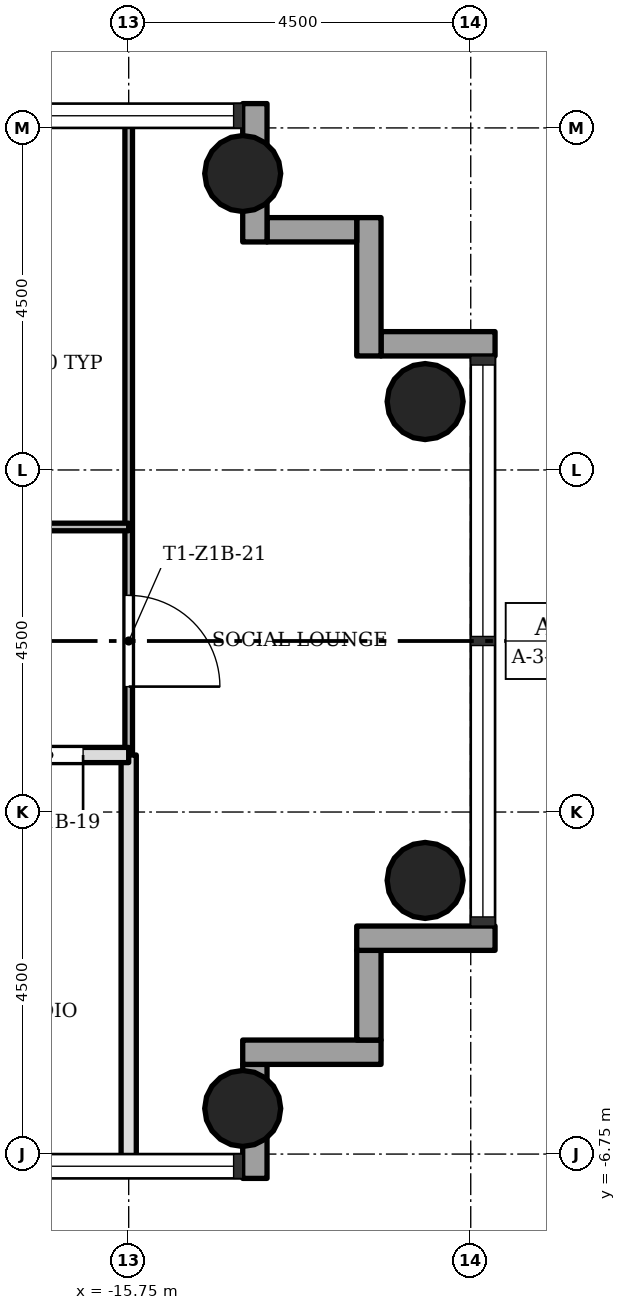
"""IFC4 building model, lengths in metres.
Left out: names, types, materials, properties, quantities, classifications, styles, units other than length and angle.
Written with IfcOpenShell. Run it as: python <this file> out.ifc"""

import sys

from ifc_helpers import new_model, si_unit, direction, frame, frame_2d, origin, origin_2d, place, context, subcontext, project, spatial, rectangle, hollow_circle, extrude, element, fill, save


model = new_model("IFC4")
c1 = context("Model", 3, precision=1e-05, world=origin(), true_north=direction((0.0, 1.0)))
c2 = subcontext(c1, "Body", "Model", "MODEL_VIEW")
j1 = project(units=[si_unit("LENGTHUNIT", "METRE"), si_unit("PLANEANGLEUNIT", "RADIAN")], contexts=[c1])
p1 = place(None, origin())
s1 = spatial("IfcSite", under=j1, at=p1, CompositionType="ELEMENT")
p2 = place(p1, origin())
s2 = spatial("IfcBuilding", under=s1, at=p2, CompositionType="ELEMENT")
p3 = place(p2, frame((0.0, 0.0, 34.7)))
s3 = spatial("IfcBuildingStorey", under=s2, at=p3, CompositionType="ELEMENT", Elevation=34.7)
for number, where, z_axis, x_axis in (
    (1, (-14.25, -6.15, 0.0), (0.0, 0.0, 1.0), (1.0, 0.0, 0.0)),
    (2, (-14.25, 6.15, 0.0), (0.0, 0.0, 1.0), (1.0, 0.0, 0.0)),
    (3, (-11.85, -3.15, 0.0), (0.0, 0.0, 1.0), (1.0, 0.0, 0.0)),
    (4, (-11.85, 3.15, 0.0), (0.0, 0.0, 1.0), (1.0, 0.0, 0.0)),
):
    element("IfcColumn", number, at=place(p3, frame(where, z_axis=z_axis, x_axis=x_axis)), inside=s3, PredefinedType="COLUMN", context=c2, shape_type="SweptSolid", body=[
        extrude(hollow_circle(Radius=0.5, WallThickness=0.036, at=origin_2d()), origin(), (0.0, 0.0, 1.0), 3.4),
    ])
p4 = place(p3, frame((-14.09, -7.07, -0.3), z_axis=(0.0, 0.0, 1.0), x_axis=(0.0, 1.0, 0.0)))
e5 = element("IfcWall", 5, at=p4, inside=s3, PredefinedType="STANDARD", context=c2, shape_type="SweptSolid", body=[
    extrude(rectangle(XDim=1.5, YDim=0.32, at=frame_2d((0.75, 0.0))), origin(), (0.0, 0.0, 1.0), 3.4),
])
p5 = place(p3, frame((-14.25, -5.41, -0.3), z_axis=(0.0, 0.0, 1.0), x_axis=(1.0, 0.0, 0.0)))
e6 = element("IfcWall", 6, at=p5, inside=s3, PredefinedType="STANDARD", context=c2, shape_type="SweptSolid", body=[
    extrude(rectangle(XDim=1.82, YDim=0.32, at=frame_2d((0.91, 0.0))), origin(), (0.0, 0.0, 1.0), 3.4),
])
p6 = place(p3, frame((-12.59, -5.25, -0.3), z_axis=(0.0, 0.0, 1.0), x_axis=(0.0, 1.0, 0.0)))
e7 = element("IfcWall", 7, at=p6, inside=s3, PredefinedType="STANDARD", context=c2, shape_type="SweptSolid", body=[
    extrude(rectangle(XDim=1.18, YDim=0.32, at=frame_2d((0.59, 0.0))), origin(), (0.0, 0.0, 1.0), 3.4),
])
p7 = place(p3, frame((-12.75, -3.91, -0.3), z_axis=(0.0, 0.0, 1.0), x_axis=(1.0, 0.0, 0.0)))
e8 = element("IfcWall", 8, at=p7, inside=s3, PredefinedType="STANDARD", context=c2, shape_type="SweptSolid", body=[
    extrude(rectangle(XDim=1.82, YDim=0.32, at=frame_2d((0.91, 0.0))), origin(), (0.0, 0.0, 1.0), 3.4),
])
p8 = place(p3, frame((-10.93, 3.91, -0.3), z_axis=(0.0, 0.0, 1.0), x_axis=(-1.0, 0.0, 0.0)))
e9 = element("IfcWall", 9, at=p8, inside=s3, PredefinedType="STANDARD", context=c2, shape_type="SweptSolid", body=[
    extrude(rectangle(XDim=1.5, YDim=0.32, at=frame_2d((0.75, 0.0))), origin(), (0.0, 0.0, 1.0), 3.4),
])
p9 = place(p3, frame((-12.59, 3.75, -0.3), z_axis=(0.0, 0.0, 1.0), x_axis=(0.0, 1.0, 0.0)))
e10 = element("IfcWall", 10, at=p9, inside=s3, PredefinedType="STANDARD", context=c2, shape_type="SweptSolid", body=[
    extrude(rectangle(XDim=1.82, YDim=0.32, at=frame_2d((0.91, 0.0))), origin(), (0.0, 0.0, 1.0), 3.4),
])
p10 = place(p3, frame((-12.75, 5.41, -0.3), z_axis=(0.0, 0.0, 1.0), x_axis=(-1.0, 0.0, 0.0)))
e11 = element("IfcWall", 11, at=p10, inside=s3, PredefinedType="STANDARD", context=c2, shape_type="SweptSolid", body=[
    extrude(rectangle(XDim=1.18, YDim=0.32, at=frame_2d((0.59, 0.0))), origin(), (0.0, 0.0, 1.0), 3.4),
])
p11 = place(p3, frame((-14.09, 5.25, -0.3), z_axis=(0.0, 0.0, 1.0), x_axis=(0.0, 1.0, 0.0)))
e12 = element("IfcWall", 12, at=p11, inside=s3, PredefinedType="STANDARD", context=c2, shape_type="SweptSolid", body=[
    extrude(rectangle(XDim=1.82, YDim=0.32, at=frame_2d((0.91, 0.0))), origin(), (0.0, 0.0, 1.0), 3.4),
])
p12 = place(p3, frame((-15.75, -1.5, 0.0), z_axis=(0.0, 0.0, 1.0), x_axis=(0.0, 1.0, 0.0)))
e13 = element("IfcWall", 13, at=p12, inside=s3, PredefinedType="PARTITIONING", context=c2, shape_type="SweptSolid", body=[
    extrude(rectangle(XDim=8.35, YDim=0.1, at=frame_2d((4.175, 0.0))), origin(), (0.0, 0.0, 1.0), 3.0),
])
p13 = place(p12, frame((0.9, 0.0, 0.0)))
e14 = element("IfcOpeningElement", 14, at=p13, cuts=e13, PredefinedType="OPENING", context=c2, shape_type="SweptSolid", body=[
    extrude(rectangle(XDim=1.2, YDim=2.1, at=frame_2d((0.6, 1.05))), frame((0.0, 0.06, 0.0), z_axis=(0.0, -1.0, 0.0), x_axis=(1.0, 0.0, 0.0)), (0.0, 0.0, 1.0), 0.12),
])
p14 = place(p3, frame((-15.75, -6.85, 0.0), z_axis=(0.0, 0.0, 1.0), x_axis=(0.0, 1.0, 0.0)))
e15 = element("IfcWall", 15, at=p14, inside=s3, PredefinedType="SOLIDWALL", context=c2, shape_type="SweptSolid", body=[
    extrude(rectangle(XDim=5.35, YDim=0.2, at=frame_2d((2.675, 0.0))), origin(), (0.0, 0.0, 1.0), 3.0),
])
p15 = place(p3, frame((-20.25, -1.5, 0.0), z_axis=(0.0, 0.0, 1.0), x_axis=(1.0, 0.0, 0.0)))
e16 = element("IfcWall", 16, at=p15, inside=s3, PredefinedType="SOLIDWALL", context=c2, shape_type="SweptSolid", body=[
    extrude(rectangle(XDim=4.5, YDim=0.2, at=frame_2d((2.25, 0.0))), origin(), (0.0, 0.0, 1.0), 3.0),
])
p16 = place(p15, frame((3.0, 0.0, 0.0)))
e17 = element("IfcOpeningElement", 17, at=p16, cuts=e16, PredefinedType="OPENING", context=c2, shape_type="SweptSolid", body=[
    extrude(rectangle(XDim=0.9, YDim=2.1, at=frame_2d((0.45, 1.05))), frame((0.0, 0.11, 0.0), z_axis=(0.0, -1.0, 0.0), x_axis=(1.0, 0.0, 0.0)), (0.0, 0.0, 1.0), 0.22),
])
p17 = place(p3, frame((-20.25, 1.5, 0.0), z_axis=(0.0, 0.0, 1.0), x_axis=(1.0, 0.0, 0.0)))
e18 = element("IfcWall", 18, at=p17, inside=s3, PredefinedType="PARTITIONING", context=c2, shape_type="SweptSolid", body=[
    extrude(rectangle(XDim=4.5, YDim=0.1, at=frame_2d((2.25, 0.0))), origin(), (0.0, 0.0, 1.0), 3.0),
])
p18 = place(p17, frame((1.8, 0.0, 0.0)))
e19 = element("IfcOpeningElement", 19, at=p18, cuts=e18, PredefinedType="OPENING", context=c2, shape_type="SweptSolid", body=[
    extrude(rectangle(XDim=0.9, YDim=2.1, at=frame_2d((0.45, 1.05))), frame((0.0, 0.06, 0.0), z_axis=(0.0, -1.0, 0.0), x_axis=(1.0, 0.0, 0.0)), (0.0, 0.0, 1.0), 0.12),
])
p19 = place(p16, origin())
e20 = element("IfcDoor", 20, at=p19, inside=s3, OperationType="SINGLE_SWING_RIGHT", PredefinedType="DOOR", context=c2, shape_type="SweptSolid", body=[
    extrude(rectangle(XDim=0.9, YDim=2.1, at=frame_2d((0.45, 1.05))), frame((0.0, 0.025, 0.0), z_axis=(0.0, -1.0, 0.0), x_axis=(1.0, 0.0, 0.0)), (0.0, 0.0, 1.0), 0.05),
])
fill(e17, e20)
p20 = place(p13, origin())
e21 = element("IfcDoor", 21, at=p20, inside=s3, OperationType="SINGLE_SWING_LEFT", PredefinedType="DOOR", context=c2, shape_type="SweptSolid", body=[
    extrude(rectangle(XDim=1.2, YDim=2.1, at=frame_2d((0.6, 1.05))), frame((0.0, 0.025, 0.0), z_axis=(0.0, -1.0, 0.0), x_axis=(1.0, 0.0, 0.0)), (0.0, 0.0, 1.0), 0.05),
])
fill(e14, e21)
save(model, sys.argv[1])
